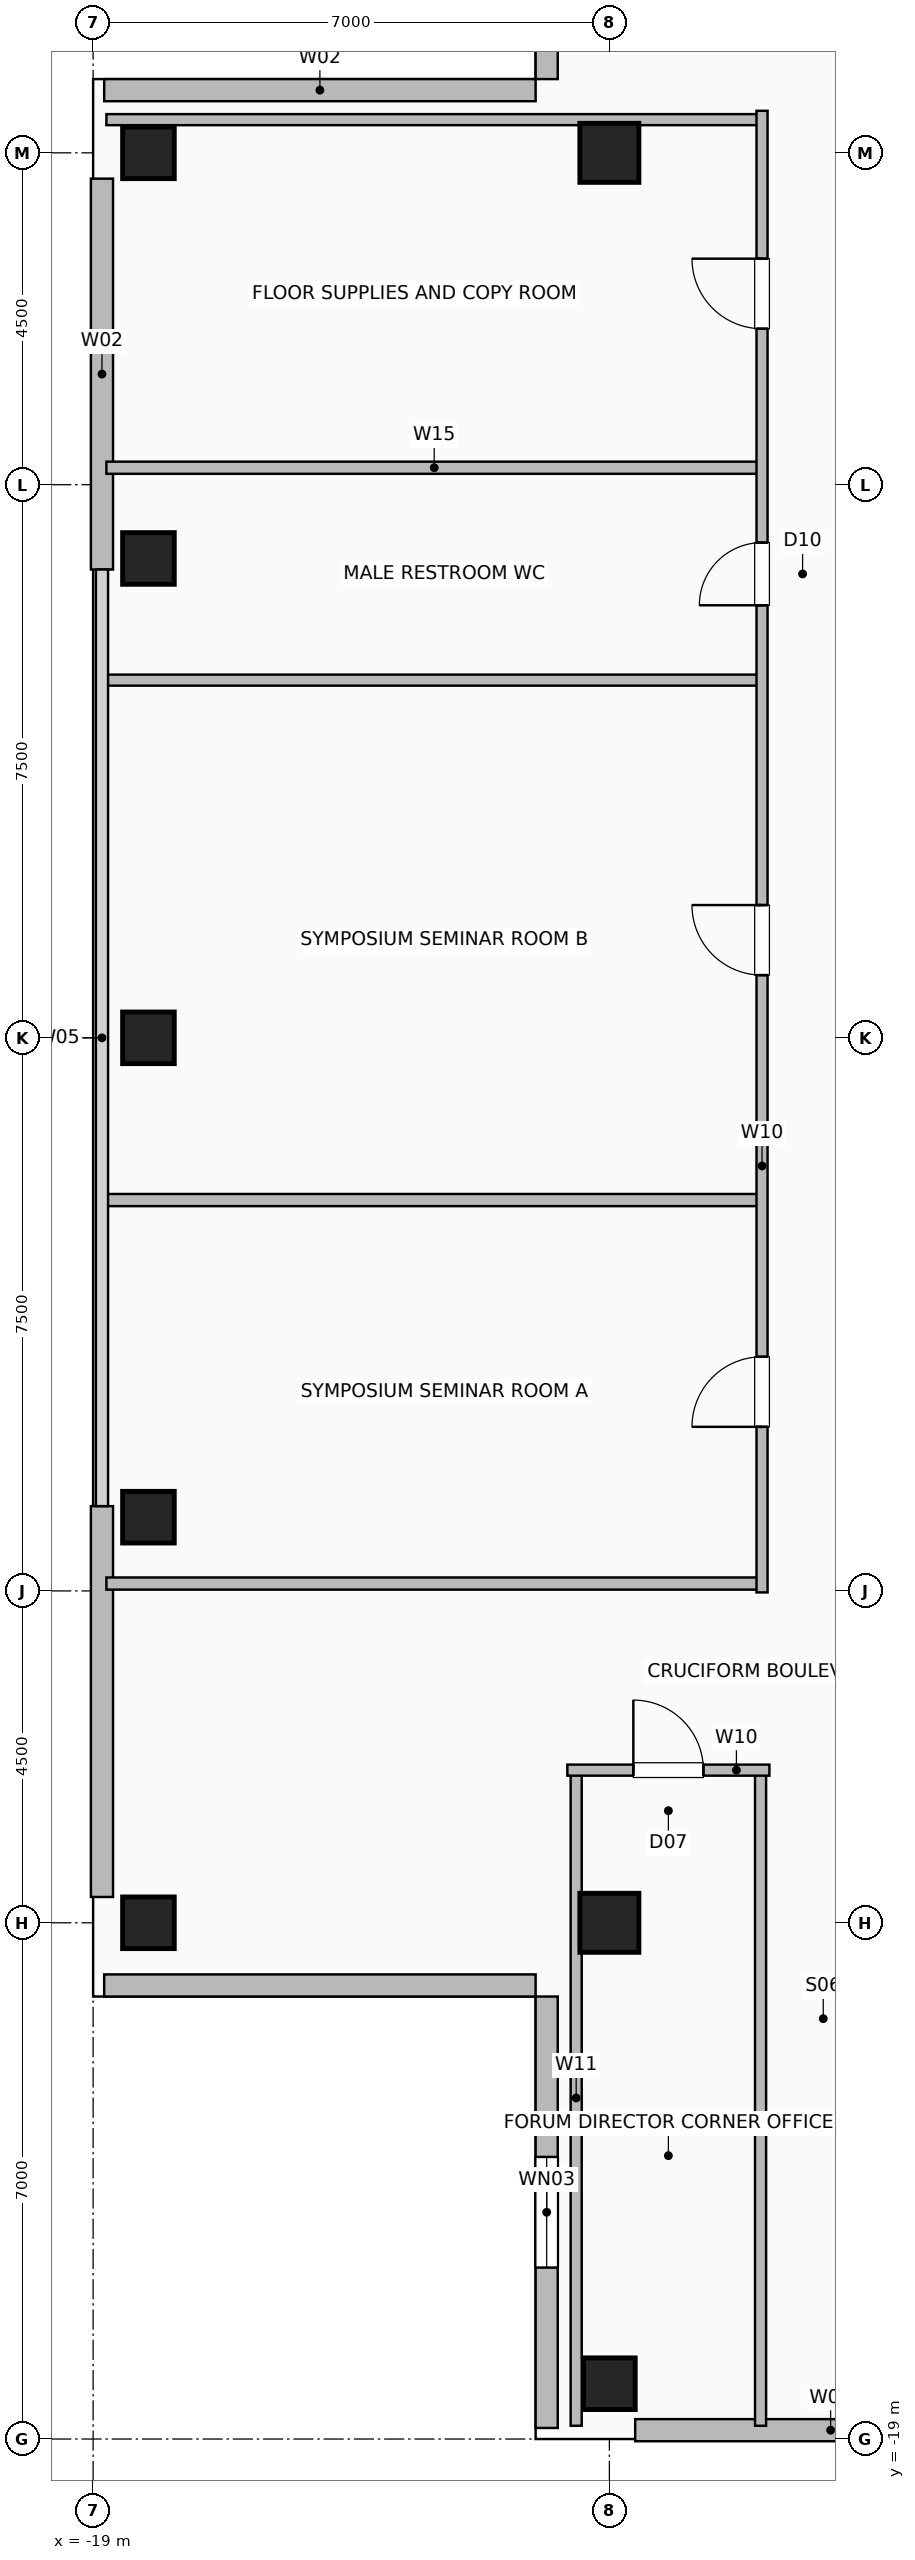
"""IFC4 building model, lengths in metres.
Left out: names, types, materials, properties, quantities, classifications, styles, units other than length and angle.
Written with IfcOpenShell. Run it as: python <this file> out.ifc"""

import sys

from ifc_helpers import new_model, si_unit, direction, frame, frame_2d, origin, origin_2d, place, context, subcontext, project, spatial, rectangle, hollow_rectangle, extrude, element, fill, save


model = new_model("IFC4")
c1 = context("Model", 3, precision=1e-05, world=origin(), true_north=direction((0.0, 1.0)))
c2 = subcontext(c1, "Body", "Model", "MODEL_VIEW")
j1 = project(units=[si_unit("LENGTHUNIT", "METRE"), si_unit("PLANEANGLEUNIT", "RADIAN")], contexts=[c1])
p1 = place(None, origin())
s1 = spatial("IfcSite", under=j1, at=p1, CompositionType="ELEMENT")
p2 = place(p1, origin())
s2 = spatial("IfcBuilding", under=s1, at=p2, CompositionType="ELEMENT")
p3 = place(p2, frame((0.0, 0.0, 290.0)))
s3 = spatial("IfcBuildingStorey", under=s2, at=p3, CompositionType="ELEMENT", Elevation=290.0)
for number, where, z_axis, x_axis in (
    (1, (-12.0, -18.25, 0.0), (0.0, 0.0, 1.0), (1.0, 0.0, 0.0)),
    (2, (-18.25, -12.0, 0.0), (0.0, 0.0, 1.0), (1.0, 0.0, 0.0)),
    (3, (-18.25, -6.5, 0.0), (0.0, 0.0, 1.0), (1.0, 0.0, 0.0)),
    (4, (-18.25, 0.0, 0.0), (0.0, 0.0, 1.0), (1.0, 0.0, 0.0)),
    (5, (-18.25, 6.5, 0.0), (0.0, 0.0, 1.0), (1.0, 0.0, 0.0)),
    (6, (-18.25, 12.0, 0.0), (0.0, 0.0, 1.0), (1.0, 0.0, 0.0)),
):
    element("IfcColumn", number, at=place(p3, frame(where, z_axis=z_axis, x_axis=x_axis)), inside=s3, PredefinedType="COLUMN", context=c2, shape_type="SweptSolid", body=[
        extrude(hollow_rectangle(XDim=0.7, YDim=0.7, WallThickness=0.035, at=origin_2d()), origin(), (0.0, 0.0, 1.0), 3.6),
    ])
for number, where, z_axis, x_axis in (
    (7, (-12.0, -12.0, 0.0), (0.0, 0.0, 1.0), (1.0, 0.0, 0.0)),
    (8, (-12.0, 12.0, 0.0), (0.0, 0.0, 1.0), (1.0, 0.0, 0.0)),
):
    element("IfcColumn", number, at=place(p3, frame(where, z_axis=z_axis, x_axis=x_axis)), inside=s3, PredefinedType="COLUMN", context=c2, shape_type="SweptSolid", body=[
        extrude(hollow_rectangle(XDim=0.8, YDim=0.8, WallThickness=0.04, at=origin_2d()), origin(), (0.0, 0.0, 1.0), 3.6),
    ])
for number, where, z_axis, x_axis in (
    (9, (-11.65, -18.88, 0.0), (0.0, 0.0, 1.0), (1.0, 0.0, 0.0)),
    (10, (-18.88, -11.65, 0.0), (0.0, 0.0, 1.0), (0.0, 1.0, 0.0)),
    (11, (-18.88, 6.35, 0.0), (0.0, 0.0, 1.0), (0.0, 1.0, 0.0)),
):
    element("IfcWall", number, at=place(p3, frame(where, z_axis=z_axis, x_axis=x_axis)), inside=s3, PredefinedType="SOLIDWALL", context=c2, shape_type="SweptSolid", body=[
        extrude(rectangle(XDim=5.3, YDim=0.3, at=frame_2d((2.65, 0.0))), origin(), (0.0, 0.0, 1.0), 3.36),
    ])
p4 = place(p3, frame((-12.85, -18.85, 0.0), z_axis=(0.0, 0.0, 1.0), x_axis=(0.0, 1.0, 0.0)))
e12 = element("IfcWall", 12, at=p4, inside=s3, PredefinedType="SOLIDWALL", context=c2, shape_type="SweptSolid", body=[
    extrude(rectangle(XDim=5.85, YDim=0.3, at=frame_2d((2.925, 0.0))), origin(), (0.0, 0.0, 1.0), 3.36),
])
p5 = place(p4, frame((2.175, 0.0, 0.9)))
e13 = element("IfcOpeningElement", 13, at=p5, cuts=e12, PredefinedType="OPENING", context=c2, shape_type="SweptSolid", body=[
    extrude(rectangle(XDim=1.5, YDim=1.8, at=frame_2d((0.75, 0.9))), frame((0.0, 0.16, 0.0), z_axis=(0.0, -1.0, 0.0), x_axis=(1.0, 0.0, 0.0)), (0.0, 0.0, 1.0), 0.32),
])
p6 = place(p3, frame((-18.85, -12.85, 0.0), z_axis=(0.0, 0.0, 1.0), x_axis=(1.0, 0.0, 0.0)))
e14 = element("IfcWall", 14, at=p6, inside=s3, PredefinedType="SOLIDWALL", context=c2, shape_type="SweptSolid", body=[
    extrude(rectangle(XDim=5.85, YDim=0.3, at=frame_2d((2.925, 0.0))), origin(), (0.0, 0.0, 1.0), 3.36),
])
p7 = place(p3, frame((-12.85, 18.85, 0.0), z_axis=(0.0, 0.0, 1.0), x_axis=(0.0, -1.0, 0.0)))
e15 = element("IfcWall", 15, at=p7, inside=s3, PredefinedType="SOLIDWALL", context=c2, shape_type="SweptSolid", body=[
    extrude(rectangle(XDim=5.85, YDim=0.3, at=frame_2d((2.925, 0.0))), origin(), (0.0, 0.0, 1.0), 3.36),
])
p8 = place(p7, frame((2.175, 0.0, 0.9)))
e16 = element("IfcOpeningElement", 16, at=p8, cuts=e15, PredefinedType="OPENING", context=c2, shape_type="SweptSolid", body=[
    extrude(rectangle(XDim=1.5, YDim=1.8, at=frame_2d((0.75, 0.9))), frame((0.0, 0.16, 0.0), z_axis=(0.0, -1.0, 0.0), x_axis=(1.0, 0.0, 0.0)), (0.0, 0.0, 1.0), 0.32),
])
p9 = place(p3, frame((-18.85, 12.85, 0.0), z_axis=(0.0, 0.0, 1.0), x_axis=(1.0, 0.0, 0.0)))
e17 = element("IfcWall", 17, at=p9, inside=s3, PredefinedType="SOLIDWALL", context=c2, shape_type="SweptSolid", body=[
    extrude(rectangle(XDim=5.85, YDim=0.3, at=frame_2d((2.925, 0.0))), origin(), (0.0, 0.0, 1.0), 3.36),
])
for number, where, z_axis, x_axis in (
    (18, (-12.45, -18.82, 0.0), (0.0, 0.0, 1.0), (0.0, 1.0, 0.0)),
    (19, (-9.95, -18.82, 0.0), (0.0, 0.0, 1.0), (0.0, 1.0, 0.0)),
):
    element("IfcWall", number, at=place(p3, frame(where, z_axis=z_axis, x_axis=x_axis)), inside=s3, PredefinedType="PARTITIONING", context=c2, shape_type="SweptSolid", body=[
        extrude(rectangle(XDim=8.89, YDim=0.15, at=frame_2d((4.445, 0.0))), origin(), (0.0, 0.0, 1.0), 3.36),
    ])
p10 = place(p3, frame((-12.57, -9.93, 0.0), z_axis=(0.0, 0.0, 1.0), x_axis=(1.0, 0.0, 0.0)))
e20 = element("IfcWall", 20, at=p10, inside=s3, PredefinedType="PARTITIONING", context=c2, shape_type="SweptSolid", body=[
    extrude(rectangle(XDim=2.74, YDim=0.15, at=frame_2d((1.37, 0.0))), origin(), (0.0, 0.0, 1.0), 3.36),
])
p11 = place(p10, frame((0.895, 0.0, 0.0)))
e21 = element("IfcOpeningElement", 21, at=p11, cuts=e20, PredefinedType="OPENING", context=c2, shape_type="SweptSolid", body=[
    extrude(rectangle(XDim=0.95, YDim=2.06, at=frame_2d((0.475, 1.03))), frame((0.0, 0.085, 0.0), z_axis=(0.0, -1.0, 0.0), x_axis=(1.0, 0.0, 0.0)), (0.0, 0.0, 1.0), 0.17),
])
for number, where, z_axis, x_axis in (
    (22, (-18.82, 7.73, 0.0), (0.0, 0.0, 1.0), (1.0, 0.0, 0.0)),
    (23, (-18.82, -7.4, 0.0), (0.0, 0.0, 1.0), (1.0, 0.0, 0.0)),
    (24, (-18.82, -2.2, 0.0), (0.0, 0.0, 1.0), (1.0, 0.0, 0.0)),
):
    element("IfcWall", number, at=place(p3, frame(where, z_axis=z_axis, x_axis=x_axis)), inside=s3, PredefinedType="PLUMBINGWALL", context=c2, shape_type="SweptSolid", body=[
        extrude(rectangle(XDim=8.89, YDim=0.165, at=frame_2d((4.445, 0.0))), origin(), (0.0, 0.0, 1.0), 3.36),
    ])
p12 = place(p3, frame((-18.82, 4.85, 0.0), z_axis=(0.0, 0.0, 1.0), x_axis=(1.0, 0.0, 0.0)))
e25 = element("IfcWall", 25, at=p12, inside=s3, PredefinedType="PARTITIONING", context=c2, shape_type="SweptSolid", body=[
    extrude(rectangle(XDim=8.89, YDim=0.15, at=frame_2d((4.445, 0.0))), origin(), (0.0, 0.0, 1.0), 2.977),
])
p13 = place(p3, frame((-18.82, 12.45, 0.0), z_axis=(0.0, 0.0, 1.0), x_axis=(1.0, 0.0, 0.0)))
e26 = element("IfcWall", 26, at=p13, inside=s3, PredefinedType="PARTITIONING", context=c2, shape_type="SweptSolid", body=[
    extrude(rectangle(XDim=8.89, YDim=0.15, at=frame_2d((4.445, 0.0))), origin(), (0.0, 0.0, 1.0), 3.36),
])
p14 = place(p3, frame((-9.93, -7.52, 0.0), z_axis=(0.0, 0.0, 1.0), x_axis=(0.0, 1.0, 0.0)))
e27 = element("IfcWall", 27, at=p14, inside=s3, PredefinedType="PARTITIONING", context=c2, shape_type="SweptSolid", body=[
    extrude(rectangle(XDim=20.09, YDim=0.15, at=frame_2d((10.045, 0.0))), origin(), (0.0, 0.0, 1.0), 3.36),
])
p15 = place(p14, frame((2.245, 0.0, 0.0)))
e28 = element("IfcOpeningElement", 28, at=p15, cuts=e27, PredefinedType="OPENING", context=c2, shape_type="SweptSolid", body=[
    extrude(rectangle(XDim=0.95, YDim=2.06, at=frame_2d((0.475, 1.03))), frame((0.0, 0.085, 0.0), z_axis=(0.0, -1.0, 0.0), x_axis=(1.0, 0.0, 0.0)), (0.0, 0.0, 1.0), 0.17),
])
p16 = place(p14, frame((8.37, 0.0, 0.0)))
e29 = element("IfcOpeningElement", 29, at=p16, cuts=e27, PredefinedType="OPENING", context=c2, shape_type="SweptSolid", body=[
    extrude(rectangle(XDim=0.95, YDim=2.06, at=frame_2d((0.475, 1.03))), frame((0.0, 0.085, 0.0), z_axis=(0.0, -1.0, 0.0), x_axis=(1.0, 0.0, 0.0)), (0.0, 0.0, 1.0), 0.17),
])
p17 = place(p14, frame((13.385, 0.0, 0.0)))
e30 = element("IfcOpeningElement", 30, at=p17, cuts=e27, PredefinedType="OPENING", context=c2, shape_type="SweptSolid", body=[
    extrude(rectangle(XDim=0.85, YDim=2.05, at=frame_2d((0.425, 1.025))), frame((0.0, 0.085, 0.0), z_axis=(0.0, -1.0, 0.0), x_axis=(1.0, 0.0, 0.0)), (0.0, 0.0, 1.0), 0.17),
])
p18 = place(p14, frame((17.135, 0.0, 0.0)))
e31 = element("IfcOpeningElement", 31, at=p18, cuts=e27, PredefinedType="OPENING", context=c2, shape_type="SweptSolid", body=[
    extrude(rectangle(XDim=0.95, YDim=2.06, at=frame_2d((0.475, 1.03))), frame((0.0, 0.085, 0.0), z_axis=(0.0, -1.0, 0.0), x_axis=(1.0, 0.0, 0.0)), (0.0, 0.0, 1.0), 0.17),
])
p19 = place(p5, origin())
e32 = element("IfcWindow", 32, at=p19, inside=s3, PartitioningType="SINGLE_PANEL", PredefinedType="WINDOW", context=c2, shape_type="SweptSolid", body=[
    extrude(rectangle(XDim=1.5, YDim=1.8, at=frame_2d((0.75, 0.9))), frame((0.0, 0.03, 0.0), z_axis=(0.0, -1.0, 0.0), x_axis=(1.0, 0.0, 0.0)), (0.0, 0.0, 1.0), 0.06),
])
fill(e13, e32)
p20 = place(p11, origin())
e33 = element("IfcDoor", 33, at=p20, inside=s3, OperationType="SINGLE_SWING_LEFT", PredefinedType="DOOR", context=c2, shape_type="SweptSolid", body=[
    extrude(rectangle(XDim=0.95, YDim=2.06, at=frame_2d((0.475, 1.03))), frame((0.0, 0.025, 0.0), z_axis=(0.0, -1.0, 0.0), x_axis=(1.0, 0.0, 0.0)), (0.0, 0.0, 1.0), 0.05),
])
fill(e21, e33)
p21 = place(p15, origin())
e34 = element("IfcDoor", 34, at=p21, inside=s3, OperationType="SINGLE_SWING_LEFT", PredefinedType="DOOR", context=c2, shape_type="SweptSolid", body=[
    extrude(rectangle(XDim=0.95, YDim=2.06, at=frame_2d((0.475, 1.03))), frame((0.0, 0.025, 0.0), z_axis=(0.0, -1.0, 0.0), x_axis=(1.0, 0.0, 0.0)), (0.0, 0.0, 1.0), 0.05),
])
fill(e28, e34)
p22 = place(p16, origin())
e35 = element("IfcDoor", 35, at=p22, inside=s3, OperationType="SINGLE_SWING_RIGHT", PredefinedType="DOOR", context=c2, shape_type="SweptSolid", body=[
    extrude(rectangle(XDim=0.95, YDim=2.06, at=frame_2d((0.475, 1.03))), frame((0.0, 0.025, 0.0), z_axis=(0.0, -1.0, 0.0), x_axis=(1.0, 0.0, 0.0)), (0.0, 0.0, 1.0), 0.05),
])
fill(e29, e35)
p23 = place(p17, origin())
e36 = element("IfcDoor", 36, at=p23, inside=s3, OperationType="SINGLE_SWING_LEFT", PredefinedType="DOOR", context=c2, shape_type="SweptSolid", body=[
    extrude(rectangle(XDim=0.85, YDim=2.05, at=frame_2d((0.425, 1.025))), frame((0.0, 0.025, 0.0), z_axis=(0.0, -1.0, 0.0), x_axis=(1.0, 0.0, 0.0)), (0.0, 0.0, 1.0), 0.05),
])
fill(e30, e36)
p24 = place(p18, origin())
e37 = element("IfcDoor", 37, at=p24, inside=s3, OperationType="SINGLE_SWING_RIGHT", PredefinedType="DOOR", context=c2, shape_type="SweptSolid", body=[
    extrude(rectangle(XDim=0.95, YDim=2.06, at=frame_2d((0.475, 1.03))), frame((0.0, 0.025, 0.0), z_axis=(0.0, -1.0, 0.0), x_axis=(1.0, 0.0, 0.0)), (0.0, 0.0, 1.0), 0.05),
])
fill(e31, e37)
save(model, sys.argv[1])
